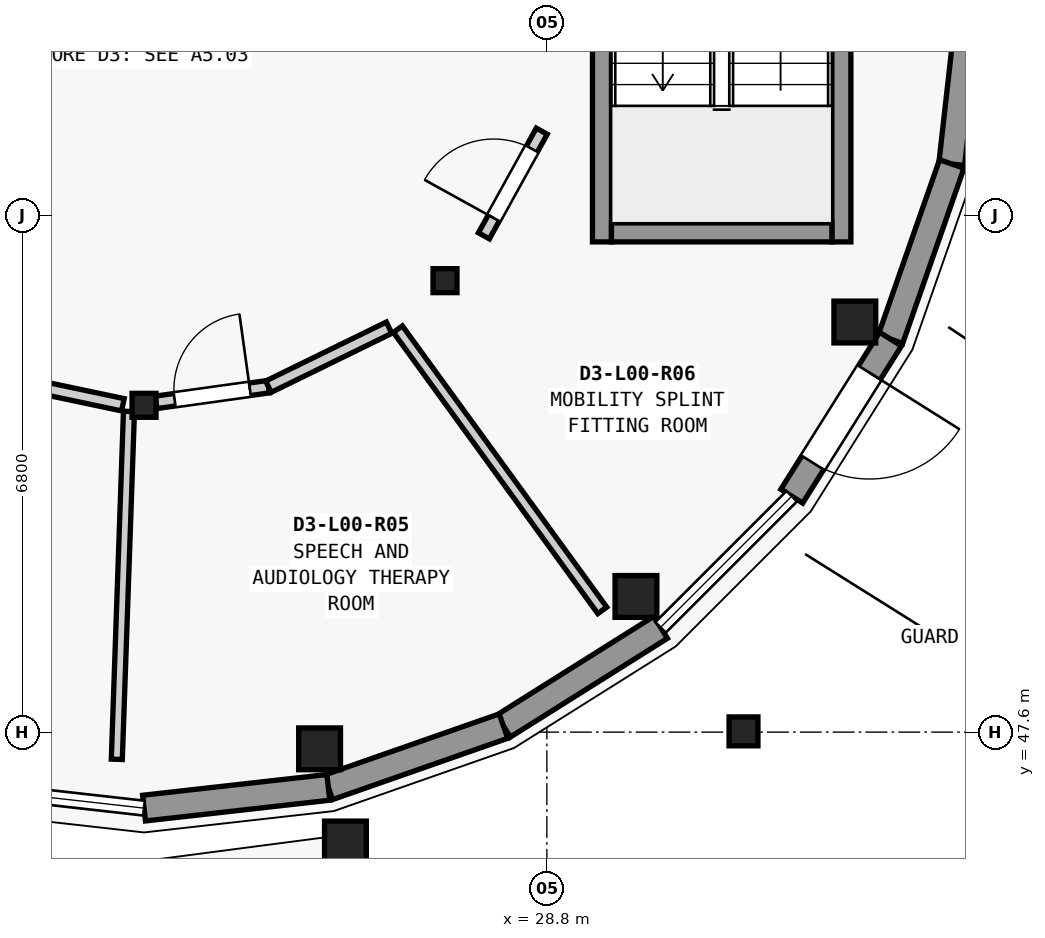
"""IFC4 building model, lengths in metres.
Left out: names, types, materials, properties, quantities, classifications, styles, units other than length and angle.
Written with IfcOpenShell. Run it as: python <this file> out.ifc"""

import sys

from ifc_helpers import new_model, si_unit, direction, frame, frame_2d, origin, origin_2d, place, context, subcontext, project, spatial, rectangle, circle, extrude, element, fill, save


model = new_model("IFC4")
c1 = context("Model", 3, precision=1e-05, world=origin(), true_north=direction((0.0, 1.0)))
c2 = subcontext(c1, "Body", "Model", "MODEL_VIEW")
j1 = project(units=[si_unit("LENGTHUNIT", "METRE"), si_unit("PLANEANGLEUNIT", "RADIAN")], contexts=[c1])
p1 = place(None, origin())
s1 = spatial("IfcSite", under=j1, at=p1, CompositionType="ELEMENT")
p2 = place(p1, origin())
s2 = spatial("IfcBuilding", under=s1, at=p2, CompositionType="ELEMENT")
p3 = place(p2, origin())
s3 = spatial("IfcBuildingStorey", under=s2, at=p3, CompositionType="ELEMENT", Elevation=0.0)
for number, where, z_axis, x_axis in (
    (1, (25.81, 47.38, 0.0), (0.0, 0.0, 1.0), (1.0, 0.0, 0.0)),
    (2, (29.972, 49.385, 0.0), (0.0, 0.0, 1.0), (1.0, 0.0, 0.0)),
    (3, (32.852, 52.996, 0.0), (0.0, 0.0, 1.0), (1.0, 0.0, 0.0)),
):
    element("IfcColumn", number, at=place(p3, frame(where, z_axis=z_axis, x_axis=x_axis)), inside=s3, PredefinedType="PILASTER", context=c2, shape_type="SweptSolid", body=[
        extrude(circle(Radius=0.275, at=origin_2d()), origin(), (0.0, 0.0, 1.0), 4.55),
    ])
for number, where, z_axis, x_axis in (
    (4, (23.5, 51.9, 0.0), (0.0, 0.0, 1.0), (1.0, 0.0, 0.0)),
    (5, (27.46, 53.54, 0.0), (0.0, 0.0, 1.0), (1.0, 0.0, 0.0)),
):
    element("IfcColumn", number, at=place(p3, frame(where, z_axis=z_axis, x_axis=x_axis)), inside=s3, PredefinedType="COLUMN", context=c2, shape_type="SweptSolid", body=[
        extrude(rectangle(XDim=0.315, YDim=0.315, at=origin_2d()), origin(), (0.0, 0.0, 1.0), 4.55),
    ])
p4 = place(p3, frame((26.15, 46.154, 0.0), z_axis=(0.0, 0.0, 1.0), x_axis=(1.0, 0.0, 0.0)))
e6 = element("IfcColumn", 6, at=p4, inside=s3, PredefinedType="PILASTER", context=c2, shape_type="SweptSolid", body=[
    extrude(circle(Radius=0.275, at=origin_2d()), origin(), (0.0, 0.0, 1.0), 4.55),
])
p5 = place(p3, frame((31.387, 47.61, 1.15), z_axis=(0.0, 0.0, 1.0), x_axis=(1.0, 0.0, 0.0)))
e7 = element("IfcColumn", 7, at=p5, inside=s3, PredefinedType="PILASTER", context=c2, shape_type="SweptSolid", body=[
    extrude(circle(Radius=0.19, at=origin_2d()), origin(), (0.0, 0.0, 1.0), 3.4),
])
p6 = place(p3, frame((34.4, 57.5, 0.0), z_axis=(0.0, 0.0, 1.0), x_axis=(-0.111847873866, -0.993725340882, 0.0)))
e8 = element("IfcWall", 8, at=p6, inside=s3, PredefinedType="SOLIDWALL", context=c2, shape_type="SweptSolid", body=[
    extrude(rectangle(XDim=2.44, YDim=0.34, at=frame_2d((1.22, 0.0))), origin(), (0.0, 0.0, 1.0), 3.659),
])
p7 = place(p3, frame((34.127, 55.075, 0.0), z_axis=(0.0, 0.0, 1.0), x_axis=(-0.330176659411, -0.943919156274, 0.0)))
e9 = element("IfcWall", 9, at=p7, inside=s3, PredefinedType="SOLIDWALL", context=c2, shape_type="SweptSolid", body=[
    extrude(rectangle(XDim=2.441, YDim=0.34, at=frame_2d((1.22, 0.0))), origin(), (0.0, 0.0, 1.0), 3.659),
])
p8 = place(p3, frame((33.321, 52.771, 0.0), z_axis=(0.0, 0.0, 1.0), x_axis=(-0.532136726684, -0.846658434148, 0.0)))
e10 = element("IfcWall", 10, at=p8, inside=s3, PredefinedType="SOLIDWALL", context=c2, shape_type="SweptSolid", body=[
    extrude(rectangle(XDim=2.441, YDim=0.34, at=frame_2d((1.221, 0.0))), origin(), (0.0, 0.0, 1.0), 3.659),
])
p9 = place(p8, frame((0.521, 0.0, 0.0)))
e11 = element("IfcOpeningElement", 11, at=p9, cuts=e10, PredefinedType="OPENING", context=c2, shape_type="SweptSolid", body=[
    extrude(rectangle(XDim=1.4, YDim=2.3, at=frame_2d((0.7, 1.15))), frame((0.0, 0.18, 0.0), z_axis=(0.0, -1.0, 0.0), x_axis=(1.0, 0.0, 0.0)), (0.0, 0.0, 1.0), 0.36),
])
p10 = place(p3, frame((30.296, 48.978, 0.0), z_axis=(0.0, 0.0, 1.0), x_axis=(-0.846658434148, -0.532136726684, 0.0)))
e12 = element("IfcWall", 12, at=p10, inside=s3, PredefinedType="SOLIDWALL", context=c2, shape_type="SweptSolid", body=[
    extrude(rectangle(XDim=2.441, YDim=0.34, at=frame_2d((1.221, 0.0))), origin(), (0.0, 0.0, 1.0), 3.659),
])
p11 = place(p3, frame((28.229, 47.679, 0.0), z_axis=(0.0, 0.0, 1.0), x_axis=(-0.943919156274, -0.330176659411, 0.0)))
e13 = element("IfcWall", 13, at=p11, inside=s3, PredefinedType="SOLIDWALL", context=c2, shape_type="SweptSolid", body=[
    extrude(rectangle(XDim=2.441, YDim=0.34, at=frame_2d((1.22, 0.0))), origin(), (0.0, 0.0, 1.0), 3.659),
])
p12 = place(p3, frame((25.925, 46.873, 0.0), z_axis=(0.0, 0.0, 1.0), x_axis=(-0.993725340882, -0.111847873866, 0.0)))
e14 = element("IfcWall", 14, at=p12, inside=s3, PredefinedType="SOLIDWALL", context=c2, shape_type="SweptSolid", body=[
    extrude(rectangle(XDim=2.44, YDim=0.34, at=frame_2d((1.22, 0.0))), origin(), (0.0, 0.0, 1.0), 3.659),
])
p13 = place(p2, frame((0.0, 0.0, -4.55)))
s4 = spatial("IfcBuildingStorey", under=s2, at=p13, CompositionType="ELEMENT", Elevation=-4.55)
p14 = place(p13, frame((33.906, 54.0, 0.0), z_axis=(0.0, 0.0, 1.0), x_axis=(1.0, 0.0, 0.0)))
e15 = element("IfcWall", 15, at=p14, inside=s4, PredefinedType="USERDEFINED", context=c2, shape_type="SweptSolid", body=[
    extrude(rectangle(XDim=5.27, YDim=0.4, at=frame_2d((2.635, 0.0))), origin(), (0.0, 0.0, 1.0), 6.68),
])
p15 = place(p3, frame((29.525, 60.95, 0.0), z_axis=(0.0, 0.0, 1.0), x_axis=(0.0, -1.0, 0.0)))
e16 = element("IfcWall", 16, at=p15, inside=s3, PredefinedType="SHEAR", context=c2, shape_type="SweptSolid", body=[
    extrude(rectangle(XDim=6.9, YDim=0.25, at=frame_2d((3.45, 0.0))), origin(), (0.0, 0.0, 1.0), 4.305),
])
p16 = place(p15, frame((0.43, 0.0, 0.0)))
e17 = element("IfcOpeningElement", 17, at=p16, cuts=e16, PredefinedType="OPENING", context=c2, shape_type="SweptSolid", body=[
    extrude(rectangle(XDim=1.1, YDim=2.15, at=frame_2d((0.55, 1.075))), frame((0.0, 0.135, 0.0), z_axis=(0.0, -1.0, 0.0), x_axis=(1.0, 0.0, 0.0)), (0.0, 0.0, 1.0), 0.27),
])
p17 = place(p3, frame((32.675, 60.95, 0.0), z_axis=(0.0, 0.0, 1.0), x_axis=(0.0, -1.0, 0.0)))
e18 = element("IfcWall", 18, at=p17, inside=s3, PredefinedType="SHEAR", context=c2, shape_type="SweptSolid", body=[
    extrude(rectangle(XDim=6.9, YDim=0.25, at=frame_2d((3.45, 0.0))), origin(), (0.0, 0.0, 1.0), 4.305),
])
p18 = place(p3, frame((29.65, 54.175, 0.0), z_axis=(0.0, 0.0, 1.0), x_axis=(1.0, 0.0, 0.0)))
e19 = element("IfcWall", 19, at=p18, inside=s3, PredefinedType="SHEAR", context=c2, shape_type="SweptSolid", body=[
    extrude(rectangle(XDim=2.9, YDim=0.25, at=frame_2d((1.45, 0.0))), origin(), (0.0, 0.0, 1.0), 4.305),
])
p19 = place(p3, frame((23.302, 51.82, 0.0), z_axis=(0.0, 0.0, 1.0), x_axis=(-0.034908318573, -0.999390518914, 0.0)))
e20 = element("IfcWall", 20, at=p19, inside=s3, PredefinedType="PARTITIONING", context=c2, shape_type="SweptSolid", body=[
    extrude(rectangle(XDim=4.581, YDim=0.145, at=frame_2d((2.291, 0.0))), origin(), (0.0, 0.0, 1.0), 3.634),
])
p20 = place(p3, frame((26.84, 52.902, 0.0), z_axis=(0.0, 0.0, 1.0), x_axis=(0.587873334136, -0.808952991843, 0.0)))
e21 = element("IfcWall", 21, at=p20, inside=s3, PredefinedType="PARTITIONING", context=c2, shape_type="SweptSolid", body=[
    extrude(rectangle(XDim=4.574, YDim=0.145, at=frame_2d((2.287, 0.0))), origin(), (0.0, 0.0, 1.0), 3.634),
])
p21 = place(p3, frame((21.493, 52.272, 0.0), z_axis=(0.0, 0.0, 1.0), x_axis=(0.978436766116, -0.206546592113, 0.0)))
e22 = element("IfcWall", 22, at=p21, inside=s3, PredefinedType="PARTITIONING", context=c2, shape_type="SweptSolid", body=[
    extrude(rectangle(XDim=1.767, YDim=0.165, at=frame_2d((0.884, 0.0))), origin(), (0.0, 0.0, 1.0), 3.634),
])
p22 = place(p3, frame((23.658, 51.939, 0.0), z_axis=(0.0, 0.0, 1.0), x_axis=(0.99043401567, 0.137987175508, 0.0)))
e23 = element("IfcWall", 23, at=p22, inside=s3, PredefinedType="PARTITIONING", context=c2, shape_type="SweptSolid", body=[
    extrude(rectangle(XDim=1.493, YDim=0.165, at=frame_2d((0.747, 0.0))), origin(), (0.0, 0.0, 1.0), 3.634),
])
p23 = place(p22, frame((0.247, 0.0, 0.0)))
e24 = element("IfcOpeningElement", 24, at=p23, cuts=e23, PredefinedType="OPENING", context=c2, shape_type="SweptSolid", body=[
    extrude(rectangle(XDim=1.0, YDim=2.14, at=frame_2d((0.5, 1.07))), frame((0.0, 0.093, 0.0), z_axis=(0.0, -1.0, 0.0), x_axis=(1.0, 0.0, 0.0)), (0.0, 0.0, 1.0), 0.185),
])
p24 = place(p3, frame((25.137, 52.145, 0.0), z_axis=(0.0, 0.0, 1.0), x_axis=(0.898398901361, 0.439180388944, 0.0)))
e25 = element("IfcWall", 25, at=p24, inside=s3, PredefinedType="PARTITIONING", context=c2, shape_type="SweptSolid", body=[
    extrude(rectangle(XDim=1.767, YDim=0.165, at=frame_2d((0.883, 0.0))), origin(), (0.0, 0.0, 1.0), 3.634),
])
p25 = place(p3, frame((27.972, 54.13, 0.0), z_axis=(0.0, 0.0, 1.0), x_axis=(0.483639192056, 0.875267463069, 0.0)))
e26 = element("IfcWall", 26, at=p25, inside=s3, PredefinedType="PARTITIONING", context=c2, shape_type="SweptSolid", body=[
    extrude(rectangle(XDim=1.573, YDim=0.165, at=frame_2d((0.787, 0.0))), origin(), (0.0, 0.0, 1.0), 3.634),
])
p26 = place(p25, frame((0.267, 0.0, 0.0)))
e27 = element("IfcOpeningElement", 27, at=p26, cuts=e26, PredefinedType="OPENING", context=c2, shape_type="SweptSolid", body=[
    extrude(rectangle(XDim=1.04, YDim=2.14, at=frame_2d((0.52, 1.07))), frame((0.0, 0.093, 0.0), z_axis=(0.0, -1.0, 0.0), x_axis=(1.0, 0.0, 0.0)), (0.0, 0.0, 1.0), 0.185),
])
p27 = place(p9, origin())
e28 = element("IfcDoor", 28, at=p27, inside=s3, OperationType="SINGLE_SWING_LEFT", PredefinedType="DOOR", context=c2, shape_type="SweptSolid", body=[
    extrude(rectangle(XDim=1.4, YDim=2.3, at=frame_2d((0.7, 1.15))), frame((0.0, 0.025, 0.0), z_axis=(0.0, -1.0, 0.0), x_axis=(1.0, 0.0, 0.0)), (0.0, 0.0, 1.0), 0.05),
])
fill(e11, e28)
p28 = place(p23, origin())
e29 = element("IfcDoor", 29, at=p28, inside=s3, OperationType="SINGLE_SWING_RIGHT", PredefinedType="DOOR", context=c2, shape_type="SweptSolid", body=[
    extrude(rectangle(XDim=1.0, YDim=2.14, at=frame_2d((0.5, 1.07))), frame((0.0, 0.025, 0.0), z_axis=(0.0, -1.0, 0.0), x_axis=(1.0, 0.0, 0.0)), (0.0, 0.0, 1.0), 0.05),
])
fill(e24, e29)
p29 = place(p26, origin())
e30 = element("IfcDoor", 30, at=p29, inside=s3, OperationType="SINGLE_SWING_LEFT", PredefinedType="DOOR", context=c2, shape_type="SweptSolid", body=[
    extrude(rectangle(XDim=1.04, YDim=2.14, at=frame_2d((0.52, 1.07))), frame((0.0, 0.025, 0.0), z_axis=(0.0, -1.0, 0.0), x_axis=(1.0, 0.0, 0.0)), (0.0, 0.0, 1.0), 0.05),
])
fill(e27, e30)
save(model, sys.argv[1])
